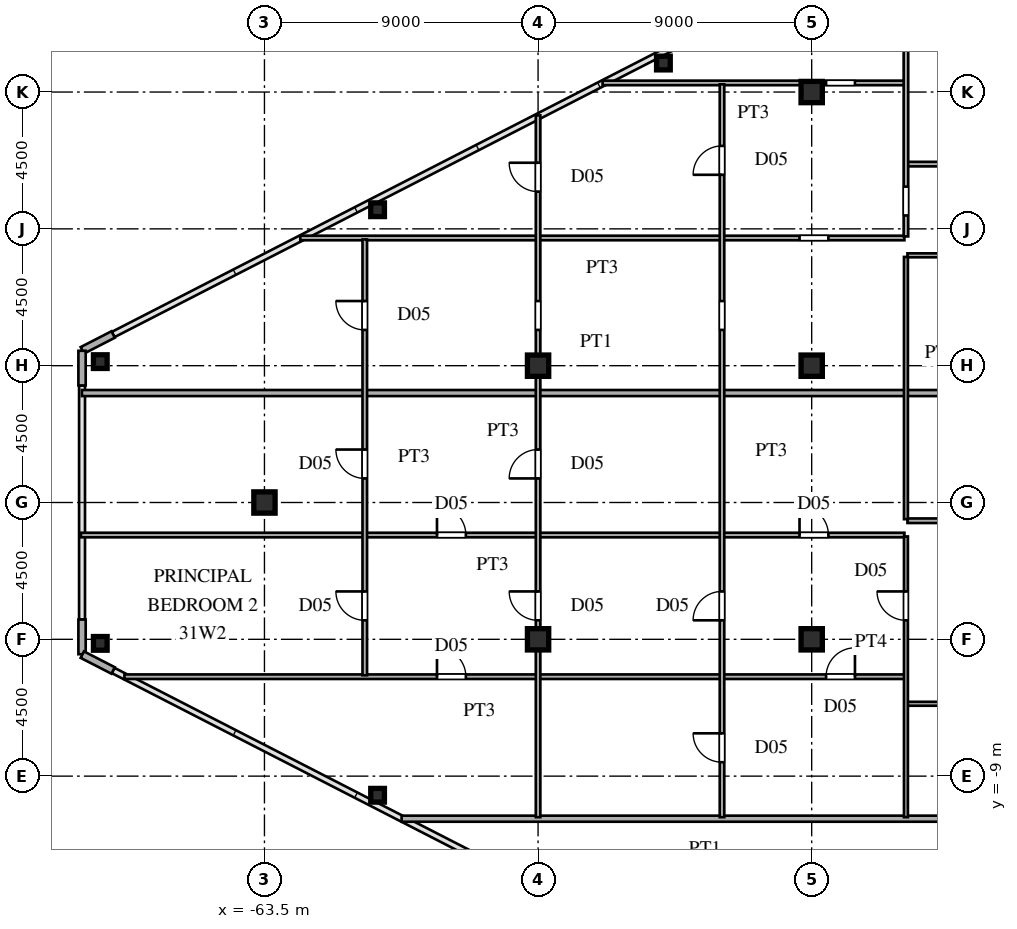
"""IFC4 building model, lengths in metres.
Left out: names, types, materials, properties, quantities, classifications, styles, units other than length and angle.
Written with IfcOpenShell. Run it as: python <this file> out.ifc"""

import sys

from ifc_helpers import new_model, si_unit, direction, frame, frame_2d, origin, origin_2d, place, context, subcontext, project, spatial, rectangle, hollow_rectangle, i_section, extrude, source, transform, mapped, element, fill, save


model = new_model("IFC4")
c1 = context("Model", 3, precision=1e-05, world=origin(), true_north=direction((0.0, 1.0)))
c2 = subcontext(c1, "Body", "Model", "MODEL_VIEW")
j1 = project(units=[si_unit("LENGTHUNIT", "METRE"), si_unit("PLANEANGLEUNIT", "RADIAN")], contexts=[c1])
p1 = place(None, origin())
s1 = spatial("IfcSite", under=j1, at=p1, CompositionType="ELEMENT")
p2 = place(p1, origin())
s2 = spatial("IfcBuilding", under=s1, at=p2, CompositionType="ELEMENT")
p3 = place(p2, frame((0.0, 0.0, 117.6)))
s3 = spatial("IfcBuildingStorey", under=s2, at=p3, CompositionType="ELEMENT", Elevation=117.6)
m1 = source(origin(), c2, "Body", "SweptSolid", [
    extrude(i_section(OverallWidth=0.7, OverallDepth=0.7, WebThickness=0.028, FlangeThickness=0.045, at=origin_2d()), origin(), (0.0, 0.0, 1.0), 3.6),
])
for number, where, z_axis, x_axis in (
    (1, (-45.5, -4.5, 0.0), (0.0, 0.0, 1.0), (1.0, 0.0, 0.0)),
    (2, (-45.5, 4.5, 0.0), (0.0, 0.0, 1.0), (1.0, 0.0, 0.0)),
    (3, (-45.5, 13.5, 0.0), (0.0, 0.0, 1.0), (1.0, 0.0, 0.0)),
    (4, (-54.5, -4.5, 0.0), (0.0, 0.0, 1.0), (1.0, 0.0, 0.0)),
    (5, (-54.5, 4.5, 0.0), (0.0, 0.0, 1.0), (1.0, 0.0, 0.0)),
    (6, (-63.5, 0.0, 0.0), (0.0, 0.0, 1.0), (1.0, 0.0, 0.0)),
):
    element("IfcColumn", number, at=place(p3, frame(where, z_axis=z_axis, x_axis=x_axis)), inside=s3, PredefinedType="COLUMN", context=c2, shape_type="MappedRepresentation", body=[
        mapped(m1, transform((0.0, 0.0, 0.0), scale=1.0)),
    ])
m2 = source(origin(), c2, "Body", "SweptSolid", [
    extrude(hollow_rectangle(XDim=0.45, YDim=0.45, WallThickness=0.018, at=origin_2d()), origin(), (0.0, 0.0, 1.0), 3.6),
])
for number, where, z_axis, x_axis in (
    (7, (-68.9, 4.634, 0.0), (0.0, 0.0, 1.0), (1.0, 0.0, 0.0)),
    (8, (-68.9, -4.634, 0.0), (0.0, 0.0, 1.0), (1.0, 0.0, 0.0)),
    (9, (-59.779, -9.629, 0.0), (0.0, 0.0, 1.0), (1.0, 0.0, 0.0)),
    (10, (-50.377, 14.453, 0.0), (0.0, 0.0, 1.0), (1.0, 0.0, 0.0)),
    (11, (-59.779, 9.629, 0.0), (0.0, 0.0, 1.0), (1.0, 0.0, 0.0)),
):
    element("IfcColumn", number, at=place(p3, frame(where, z_axis=z_axis, x_axis=x_axis)), inside=s3, PredefinedType="COLUMN", context=c2, shape_type="MappedRepresentation", body=[
        mapped(m2, transform((0.0, 0.0, 0.0), scale=1.0)),
    ])
p4 = place(p3, frame((-68.477, 5.525, 0.0), z_axis=(0.0, 0.0, 1.0), x_axis=(-0.889797395748, -0.456355776255, 0.0)))
e12 = element("IfcWall", 12, at=p4, inside=s3, PredefinedType="SOLIDWALL", context=c2, shape_type="SweptSolid", body=[
    extrude(rectangle(XDim=1.14, YDim=0.24, at=frame_2d((0.57, 0.0))), origin(), (0.0, 0.0, 1.0), 3.38),
])
for number, where, z_axis, x_axis in (
    (13, (-69.5, 4.99, 0.0), (0.0, 0.0, 1.0), (0.0, -1.0, 0.0)),
    (14, (-69.5, -3.85, 0.0), (0.0, 0.0, 1.0), (0.0, -1.0, 0.0)),
):
    element("IfcWall", number, at=place(p3, frame(where, z_axis=z_axis, x_axis=x_axis)), inside=s3, PredefinedType="SOLIDWALL", context=c2, shape_type="SweptSolid", body=[
        extrude(rectangle(XDim=1.14, YDim=0.24, at=frame_2d((0.57, 0.0))), origin(), (0.0, 0.0, 1.0), 3.38),
    ])
p5 = place(p3, frame((-69.491, -5.005, 0.0), z_axis=(0.0, 0.0, 1.0), x_axis=(0.889797395748, -0.456355776255, 0.0)))
e15 = element("IfcWall", 15, at=p5, inside=s3, PredefinedType="SOLIDWALL", context=c2, shape_type="SweptSolid", body=[
    extrude(rectangle(XDim=1.14, YDim=0.24, at=frame_2d((0.57, 0.0))), origin(), (0.0, 0.0, 1.0), 3.38),
])
p6 = place(p3, frame((-58.988, -10.4, 0.0), z_axis=(0.0, 0.0, 1.0), x_axis=(1.0, 0.0, 0.0)))
e16 = element("IfcWall", 16, at=p6, inside=s3, PredefinedType="PARTITIONING", context=c2, shape_type="SweptSolid", body=[
    extrude(rectangle(XDim=19.958, YDim=0.2, at=frame_2d((9.979, 0.0))), origin(), (0.0, 0.0, 1.0), 3.38),
])
p7 = place(p3, frame((-42.35, -6.62, 0.0), z_axis=(0.0, 0.0, 1.0), x_axis=(1.0, 0.0, 0.0)))
e17 = element("IfcWall", 17, at=p7, inside=s3, PredefinedType="PARTITIONING", context=c2, shape_type="SweptSolid", body=[
    extrude(rectangle(XDim=3.35, YDim=0.13, at=frame_2d((1.675, 0.0))), origin(), (0.0, 0.0, 1.0), 3.38),
])
p8 = place(p7, frame((1.235, 0.0, 0.0)))
e18 = element("IfcOpeningElement", 18, at=p8, cuts=e17, PredefinedType="OPENING", context=c2, shape_type="SweptSolid", body=[
    extrude(rectangle(XDim=0.88, YDim=2.1, at=frame_2d((0.44, 1.05))), frame((0.0, 0.075, 0.0), z_axis=(0.0, -1.0, 0.0), x_axis=(1.0, 0.0, 0.0)), (0.0, 0.0, 1.0), 0.15),
])
p9 = place(p3, frame((-68.106, -5.73, 0.0), z_axis=(0.0, 0.0, 1.0), x_axis=(1.0, 0.0, 0.0)))
e19 = element("IfcWall", 19, at=p9, inside=s3, PredefinedType="PARTITIONING", context=c2, shape_type="SweptSolid", body=[
    extrude(rectangle(XDim=25.656, YDim=0.15, at=frame_2d((12.828, 0.0))), origin(), (0.0, 0.0, 1.0), 3.38),
])
p10 = place(p9, frame((23.079, 0.0, 0.0)))
e20 = element("IfcOpeningElement", 20, at=p10, cuts=e19, PredefinedType="OPENING", context=c2, shape_type="SweptSolid", body=[
    extrude(rectangle(XDim=0.95, YDim=2.15, at=frame_2d((0.475, 1.075))), frame((0.0, 0.085, 0.0), z_axis=(0.0, -1.0, 0.0), x_axis=(1.0, 0.0, 0.0)), (0.0, 0.0, 1.0), 0.17),
])
p11 = place(p9, frame((10.281, 0.0, 0.0)))
e21 = element("IfcOpeningElement", 21, at=p11, cuts=e19, PredefinedType="OPENING", context=c2, shape_type="SweptSolid", body=[
    extrude(rectangle(XDim=0.95, YDim=2.15, at=frame_2d((0.475, 1.075))), frame((0.0, 0.085, 0.0), z_axis=(0.0, -1.0, 0.0), x_axis=(1.0, 0.0, 0.0)), (0.0, 0.0, 1.0), 0.17),
])
p12 = place(p3, frame((-69.535, -1.07, 0.0), z_axis=(0.0, 0.0, 1.0), x_axis=(1.0, 0.0, 0.0)))
e22 = element("IfcWall", 22, at=p12, inside=s3, PredefinedType="PARTITIONING", context=c2, shape_type="SweptSolid", body=[
    extrude(rectangle(XDim=27.085, YDim=0.15, at=frame_2d((13.542, 0.0))), origin(), (0.0, 0.0, 1.0), 3.38),
])
p13 = place(p12, frame((23.635, 0.0, 0.0)))
e23 = element("IfcOpeningElement", 23, at=p13, cuts=e22, PredefinedType="OPENING", context=c2, shape_type="SweptSolid", body=[
    extrude(rectangle(XDim=0.95, YDim=2.15, at=frame_2d((0.475, 1.075))), frame((0.0, 0.085, 0.0), z_axis=(0.0, -1.0, 0.0), x_axis=(1.0, 0.0, 0.0)), (0.0, 0.0, 1.0), 0.17),
])
p14 = place(p12, frame((11.71, 0.0, 0.0)))
e24 = element("IfcOpeningElement", 24, at=p14, cuts=e22, PredefinedType="OPENING", context=c2, shape_type="SweptSolid", body=[
    extrude(rectangle(XDim=0.95, YDim=2.15, at=frame_2d((0.475, 1.075))), frame((0.0, 0.085, 0.0), z_axis=(0.0, -1.0, 0.0), x_axis=(1.0, 0.0, 0.0)), (0.0, 0.0, 1.0), 0.17),
])
p15 = place(p3, frame((-42.35, -0.6, 0.0), z_axis=(0.0, 0.0, 1.0), x_axis=(1.0, 0.0, 0.0)))
e25 = element("IfcWall", 25, at=p15, inside=s3, PredefinedType="PARTITIONING", context=c2, shape_type="SweptSolid", body=[
    extrude(rectangle(XDim=3.35, YDim=0.15, at=frame_2d((1.675, 0.0))), origin(), (0.0, 0.0, 1.0), 3.38),
])
p16 = place(p15, frame((1.2, 0.0, 0.0)))
e26 = element("IfcOpeningElement", 26, at=p16, cuts=e25, PredefinedType="OPENING", context=c2, shape_type="SweptSolid", body=[
    extrude(rectangle(XDim=0.95, YDim=2.15, at=frame_2d((0.475, 1.075))), frame((0.0, 0.085, 0.0), z_axis=(0.0, -1.0, 0.0), x_axis=(1.0, 0.0, 0.0)), (0.0, 0.0, 1.0), 0.17),
])
p17 = place(p3, frame((-69.505, 3.6, 0.0), z_axis=(0.0, 0.0, 1.0), x_axis=(1.0, 0.0, 0.0)))
e27 = element("IfcWall", 27, at=p17, inside=s3, PredefinedType="PARTITIONING", context=c2, shape_type="SweptSolid", body=[
    extrude(rectangle(XDim=30.475, YDim=0.2, at=frame_2d((15.237, 0.0))), origin(), (0.0, 0.0, 1.0), 3.38),
])
p18 = place(p3, frame((-42.35, 8.13, 0.0), z_axis=(0.0, 0.0, 1.0), x_axis=(1.0, 0.0, 0.0)))
e28 = element("IfcWall", 28, at=p18, inside=s3, PredefinedType="PARTITIONING", context=c2, shape_type="SweptSolid", body=[
    extrude(rectangle(XDim=3.35, YDim=0.13, at=frame_2d((1.675, 0.0))), origin(), (0.0, 0.0, 1.0), 3.38),
])
p19 = place(p18, frame((1.235, 0.0, 0.0)))
e29 = element("IfcOpeningElement", 29, at=p19, cuts=e28, PredefinedType="OPENING", context=c2, shape_type="SweptSolid", body=[
    extrude(rectangle(XDim=0.88, YDim=2.1, at=frame_2d((0.44, 1.05))), frame((0.0, 0.075, 0.0), z_axis=(0.0, -1.0, 0.0), x_axis=(1.0, 0.0, 0.0)), (0.0, 0.0, 1.0), 0.15),
])
p20 = place(p3, frame((-62.321, 8.7, 0.0), z_axis=(0.0, 0.0, 1.0), x_axis=(1.0, 0.0, 0.0)))
e30 = element("IfcWall", 30, at=p20, inside=s3, PredefinedType="PARTITIONING", context=c2, shape_type="SweptSolid", body=[
    extrude(rectangle(XDim=19.871, YDim=0.15, at=frame_2d((9.936, 0.0))), origin(), (0.0, 0.0, 1.0), 3.38),
])
p21 = place(p20, frame((16.421, 0.0, 0.0)))
e31 = element("IfcOpeningElement", 31, at=p21, cuts=e30, PredefinedType="OPENING", context=c2, shape_type="SweptSolid", body=[
    extrude(rectangle(XDim=0.95, YDim=2.15, at=frame_2d((0.475, 1.075))), frame((0.0, 0.085, 0.0), z_axis=(0.0, -1.0, 0.0), x_axis=(1.0, 0.0, 0.0)), (0.0, 0.0, 1.0), 0.17),
])
p22 = place(p3, frame((-42.35, 11.13, 0.0), z_axis=(0.0, 0.0, 1.0), x_axis=(1.0, 0.0, 0.0)))
e32 = element("IfcWall", 32, at=p22, inside=s3, PredefinedType="PARTITIONING", context=c2, shape_type="SweptSolid", body=[
    extrude(rectangle(XDim=3.35, YDim=0.15, at=frame_2d((1.675, 0.0))), origin(), (0.0, 0.0, 1.0), 3.38),
])
p23 = place(p22, frame((1.2, 0.0, 0.0)))
e33 = element("IfcOpeningElement", 33, at=p23, cuts=e32, PredefinedType="OPENING", context=c2, shape_type="SweptSolid", body=[
    extrude(rectangle(XDim=0.95, YDim=2.15, at=frame_2d((0.475, 1.075))), frame((0.0, 0.085, 0.0), z_axis=(0.0, -1.0, 0.0), x_axis=(1.0, 0.0, 0.0)), (0.0, 0.0, 1.0), 0.17),
])
p24 = place(p3, frame((-52.378, 13.8, 0.0), z_axis=(0.0, 0.0, 1.0), x_axis=(1.0, 0.0, 0.0)))
e34 = element("IfcWall", 34, at=p24, inside=s3, PredefinedType="PARTITIONING", context=c2, shape_type="SweptSolid", body=[
    extrude(rectangle(XDim=9.928, YDim=0.15, at=frame_2d((4.964, 0.0))), origin(), (0.0, 0.0, 1.0), 2.78),
])
p25 = place(p24, frame((7.351, 0.0, 0.0)))
e35 = element("IfcOpeningElement", 35, at=p25, cuts=e34, PredefinedType="OPENING", context=c2, shape_type="SweptSolid", body=[
    extrude(rectangle(XDim=0.95, YDim=2.15, at=frame_2d((0.475, 1.075))), frame((0.0, 0.085, 0.0), z_axis=(0.0, -1.0, 0.0), x_axis=(1.0, 0.0, 0.0)), (0.0, 0.0, 1.0), 0.17),
])
p26 = place(p3, frame((-60.2, -5.683, 0.0), z_axis=(0.0, 0.0, 1.0), x_axis=(0.0, 1.0, 0.0)))
e36 = element("IfcWall", 36, at=p26, inside=s3, PredefinedType="PARTITIONING", context=c2, shape_type="SweptSolid", body=[
    extrude(rectangle(XDim=14.335, YDim=0.15, at=frame_2d((7.167, 0.0))), origin(), (0.0, 0.0, 1.0), 3.38),
])
p27 = place(p26, frame((1.808, 0.0, 0.0)))
e37 = element("IfcOpeningElement", 37, at=p27, cuts=e36, PredefinedType="OPENING", context=c2, shape_type="SweptSolid", body=[
    extrude(rectangle(XDim=0.95, YDim=2.15, at=frame_2d((0.475, 1.075))), frame((0.0, 0.085, 0.0), z_axis=(0.0, -1.0, 0.0), x_axis=(1.0, 0.0, 0.0)), (0.0, 0.0, 1.0), 0.17),
])
p28 = place(p26, frame((6.475, 0.0, 0.0)))
e38 = element("IfcOpeningElement", 38, at=p28, cuts=e36, PredefinedType="OPENING", context=c2, shape_type="SweptSolid", body=[
    extrude(rectangle(XDim=0.95, YDim=2.15, at=frame_2d((0.475, 1.075))), frame((0.0, 0.085, 0.0), z_axis=(0.0, -1.0, 0.0), x_axis=(1.0, 0.0, 0.0)), (0.0, 0.0, 1.0), 0.17),
])
p29 = place(p26, frame((11.359, 0.0, 0.0)))
e39 = element("IfcOpeningElement", 39, at=p29, cuts=e36, PredefinedType="OPENING", context=c2, shape_type="SweptSolid", body=[
    extrude(rectangle(XDim=0.95, YDim=2.15, at=frame_2d((0.475, 1.075))), frame((0.0, 0.085, 0.0), z_axis=(0.0, -1.0, 0.0), x_axis=(1.0, 0.0, 0.0)), (0.0, 0.0, 1.0), 0.17),
])
p30 = place(p3, frame((-54.5, -10.35, 0.0), z_axis=(0.0, 0.0, 1.0), x_axis=(0.0, 1.0, 0.0)))
e40 = element("IfcWall", 40, at=p30, inside=s3, PredefinedType="PARTITIONING", context=c2, shape_type="SweptSolid", body=[
    extrude(rectangle(XDim=23.082, YDim=0.15, at=frame_2d((11.541, 0.0))), origin(), (0.0, 0.0, 1.0), 2.78),
])
p31 = place(p30, frame((6.475, 0.0, 0.0)))
e41 = element("IfcOpeningElement", 41, at=p31, cuts=e40, PredefinedType="OPENING", context=c2, shape_type="SweptSolid", body=[
    extrude(rectangle(XDim=0.95, YDim=2.15, at=frame_2d((0.475, 1.075))), frame((0.0, 0.085, 0.0), z_axis=(0.0, -1.0, 0.0), x_axis=(1.0, 0.0, 0.0)), (0.0, 0.0, 1.0), 0.17),
])
p32 = place(p30, frame((11.142, 0.0, 0.0)))
e42 = element("IfcOpeningElement", 42, at=p32, cuts=e40, PredefinedType="OPENING", context=c2, shape_type="SweptSolid", body=[
    extrude(rectangle(XDim=0.95, YDim=2.15, at=frame_2d((0.475, 1.075))), frame((0.0, 0.085, 0.0), z_axis=(0.0, -1.0, 0.0), x_axis=(1.0, 0.0, 0.0)), (0.0, 0.0, 1.0), 0.17),
])
p33 = place(p30, frame((20.575, 0.0, 0.0)))
e43 = element("IfcOpeningElement", 43, at=p33, cuts=e40, PredefinedType="OPENING", context=c2, shape_type="SweptSolid", body=[
    extrude(rectangle(XDim=0.95, YDim=2.15, at=frame_2d((0.475, 1.075))), frame((0.0, 0.085, 0.0), z_axis=(0.0, -1.0, 0.0), x_axis=(1.0, 0.0, 0.0)), (0.0, 0.0, 1.0), 0.17),
])
p34 = place(p30, frame((16.026, 0.0, 0.0)))
e44 = element("IfcOpeningElement", 44, at=p34, cuts=e40, PredefinedType="OPENING", context=c2, shape_type="SweptSolid", body=[
    extrude(rectangle(XDim=0.95, YDim=2.15, at=frame_2d((0.475, 1.075))), frame((0.0, 0.085, 0.0), z_axis=(0.0, -1.0, 0.0), x_axis=(1.0, 0.0, 0.0)), (0.0, 0.0, 1.0), 0.17),
])
p35 = place(p3, frame((-48.45, -10.35, 0.0), z_axis=(0.0, 0.0, 1.0), x_axis=(0.0, 1.0, 0.0)))
e45 = element("IfcWall", 45, at=p35, inside=s3, PredefinedType="PARTITIONING", context=c2, shape_type="SweptSolid", body=[
    extrude(rectangle(XDim=24.104, YDim=0.15, at=frame_2d((12.052, 0.0))), origin(), (0.0, 0.0, 1.0), 3.38),
])
p36 = place(p35, frame((6.475, 0.0, 0.0)))
e46 = element("IfcOpeningElement", 46, at=p36, cuts=e45, PredefinedType="OPENING", context=c2, shape_type="SweptSolid", body=[
    extrude(rectangle(XDim=0.95, YDim=2.15, at=frame_2d((0.475, 1.075))), frame((0.0, 0.085, 0.0), z_axis=(0.0, -1.0, 0.0), x_axis=(1.0, 0.0, 0.0)), (0.0, 0.0, 1.0), 0.17),
])
p37 = place(p35, frame((1.808, 0.0, 0.0)))
e47 = element("IfcOpeningElement", 47, at=p37, cuts=e45, PredefinedType="OPENING", context=c2, shape_type="SweptSolid", body=[
    extrude(rectangle(XDim=0.95, YDim=2.15, at=frame_2d((0.475, 1.075))), frame((0.0, 0.085, 0.0), z_axis=(0.0, -1.0, 0.0), x_axis=(1.0, 0.0, 0.0)), (0.0, 0.0, 1.0), 0.17),
])
p38 = place(p35, frame((21.128, 0.0, 0.0)))
e48 = element("IfcOpeningElement", 48, at=p38, cuts=e45, PredefinedType="OPENING", context=c2, shape_type="SweptSolid", body=[
    extrude(rectangle(XDim=0.95, YDim=2.15, at=frame_2d((0.475, 1.075))), frame((0.0, 0.085, 0.0), z_axis=(0.0, -1.0, 0.0), x_axis=(1.0, 0.0, 0.0)), (0.0, 0.0, 1.0), 0.17),
])
p39 = place(p35, frame((16.026, 0.0, 0.0)))
e49 = element("IfcOpeningElement", 49, at=p39, cuts=e45, PredefinedType="OPENING", context=c2, shape_type="SweptSolid", body=[
    extrude(rectangle(XDim=0.95, YDim=2.15, at=frame_2d((0.475, 1.075))), frame((0.0, 0.085, 0.0), z_axis=(0.0, -1.0, 0.0), x_axis=(1.0, 0.0, 0.0)), (0.0, 0.0, 1.0), 0.17),
])
p40 = place(p3, frame((-42.4, -10.35, 0.0), z_axis=(0.0, 0.0, 1.0), x_axis=(0.0, 1.0, 0.0)))
e50 = element("IfcWall", 50, at=p40, inside=s3, PredefinedType="PARTITIONING", context=c2, shape_type="SweptSolid", body=[
    extrude(rectangle(XDim=9.233, YDim=0.13, at=frame_2d((4.617, 0.0))), origin(), (0.0, 0.0, 1.0), 3.38),
])
p41 = place(p40, frame((6.475, 0.0, 0.0)))
e51 = element("IfcOpeningElement", 51, at=p41, cuts=e50, PredefinedType="OPENING", context=c2, shape_type="SweptSolid", body=[
    extrude(rectangle(XDim=0.95, YDim=2.15, at=frame_2d((0.475, 1.075))), frame((0.0, 0.075, 0.0), z_axis=(0.0, -1.0, 0.0), x_axis=(1.0, 0.0, 0.0)), (0.0, 0.0, 1.0), 0.15),
])
p42 = place(p3, frame((-42.4, -0.548, 0.0), z_axis=(0.0, 0.0, 1.0), x_axis=(0.0, 1.0, 0.0)))
e52 = element("IfcWall", 52, at=p42, inside=s3, PredefinedType="PARTITIONING", context=c2, shape_type="SweptSolid", body=[
    extrude(rectangle(XDim=8.625, YDim=0.13, at=frame_2d((4.312, 0.0))), origin(), (0.0, 0.0, 1.0), 3.38),
])
p43 = place(p3, frame((-42.4, 8.752, 0.0), z_axis=(0.0, 0.0, 1.0), x_axis=(0.0, 1.0, 0.0)))
e53 = element("IfcWall", 53, at=p43, inside=s3, PredefinedType="PARTITIONING", context=c2, shape_type="SweptSolid", body=[
    extrude(rectangle(XDim=10.19, YDim=0.15, at=frame_2d((5.095, 0.0))), origin(), (0.0, 0.0, 1.0), 3.38),
])
p44 = place(p43, frame((0.688, 0.0, 0.0)))
e54 = element("IfcOpeningElement", 54, at=p44, cuts=e53, PredefinedType="OPENING", context=c2, shape_type="SweptSolid", body=[
    extrude(rectangle(XDim=0.95, YDim=2.15, at=frame_2d((0.475, 1.075))), frame((0.0, 0.085, 0.0), z_axis=(0.0, -1.0, 0.0), x_axis=(1.0, 0.0, 0.0)), (0.0, 0.0, 1.0), 0.17),
])
m3 = source(origin(), c2, "Body", "SweptSolid", [
    extrude(rectangle(XDim=0.95, YDim=2.15, at=frame_2d((0.475, 1.075))), frame((0.0, 0.025, 0.0), z_axis=(0.0, -1.0, 0.0), x_axis=(1.0, 0.0, 0.0)), (0.0, 0.0, 1.0), 0.05),
])
p45 = place(p10, origin())
e55 = element("IfcDoor", 55, at=p45, inside=s3, OperationType="SINGLE_SWING_RIGHT", PredefinedType="DOOR", context=c2, shape_type="MappedRepresentation", body=[
    mapped(m3, transform((0.0, 0.0, 0.0), scale=1.0)),
])
fill(e20, e55)
p46 = place(p11, origin())
e56 = element("IfcDoor", 56, at=p46, inside=s3, OperationType="SINGLE_SWING_LEFT", PredefinedType="DOOR", context=c2, shape_type="MappedRepresentation", body=[
    mapped(m3, transform((0.0, 0.0, 0.0), scale=1.0)),
])
fill(e21, e56)
p47 = place(p13, origin())
e57 = element("IfcDoor", 57, at=p47, inside=s3, OperationType="SINGLE_SWING_LEFT", PredefinedType="DOOR", context=c2, shape_type="MappedRepresentation", body=[
    mapped(m3, transform((0.0, 0.0, 0.0), scale=1.0)),
])
fill(e23, e57)
p48 = place(p14, origin())
e58 = element("IfcDoor", 58, at=p48, inside=s3, OperationType="SINGLE_SWING_LEFT", PredefinedType="DOOR", context=c2, shape_type="MappedRepresentation", body=[
    mapped(m3, transform((0.0, 0.0, 0.0), scale=1.0)),
])
fill(e24, e58)
p49 = place(p27, origin())
e59 = element("IfcDoor", 59, at=p49, inside=s3, OperationType="SINGLE_SWING_RIGHT", PredefinedType="DOOR", context=c2, shape_type="MappedRepresentation", body=[
    mapped(m3, transform((0.0, 0.0, 0.0), scale=1.0)),
])
fill(e37, e59)
p50 = place(p28, origin())
e60 = element("IfcDoor", 60, at=p50, inside=s3, OperationType="SINGLE_SWING_RIGHT", PredefinedType="DOOR", context=c2, shape_type="MappedRepresentation", body=[
    mapped(m3, transform((0.0, 0.0, 0.0), scale=1.0)),
])
fill(e38, e60)
p51 = place(p29, origin())
e61 = element("IfcDoor", 61, at=p51, inside=s3, OperationType="SINGLE_SWING_RIGHT", PredefinedType="DOOR", context=c2, shape_type="MappedRepresentation", body=[
    mapped(m3, transform((0.0, 0.0, 0.0), scale=1.0)),
])
fill(e39, e61)
p52 = place(p31, origin())
e62 = element("IfcDoor", 62, at=p52, inside=s3, OperationType="SINGLE_SWING_RIGHT", PredefinedType="DOOR", context=c2, shape_type="MappedRepresentation", body=[
    mapped(m3, transform((0.0, 0.0, 0.0), scale=1.0)),
])
fill(e41, e62)
p53 = place(p32, origin())
e63 = element("IfcDoor", 63, at=p53, inside=s3, OperationType="SINGLE_SWING_LEFT", PredefinedType="DOOR", context=c2, shape_type="MappedRepresentation", body=[
    mapped(m3, transform((0.0, 0.0, 0.0), scale=1.0)),
])
fill(e42, e63)
p54 = place(p33, origin())
e64 = element("IfcDoor", 64, at=p54, inside=s3, OperationType="SINGLE_SWING_RIGHT", PredefinedType="DOOR", context=c2, shape_type="MappedRepresentation", body=[
    mapped(m3, transform((0.0, 0.0, 0.0), scale=1.0)),
])
fill(e43, e64)
p55 = place(p36, origin())
e65 = element("IfcDoor", 65, at=p55, inside=s3, OperationType="SINGLE_SWING_LEFT", PredefinedType="DOOR", context=c2, shape_type="MappedRepresentation", body=[
    mapped(m3, transform((0.0, 0.0, 0.0), scale=1.0)),
])
fill(e46, e65)
p56 = place(p37, origin())
e66 = element("IfcDoor", 66, at=p56, inside=s3, OperationType="SINGLE_SWING_RIGHT", PredefinedType="DOOR", context=c2, shape_type="MappedRepresentation", body=[
    mapped(m3, transform((0.0, 0.0, 0.0), scale=1.0)),
])
fill(e47, e66)
p57 = place(p38, origin())
e67 = element("IfcDoor", 67, at=p57, inside=s3, OperationType="SINGLE_SWING_LEFT", PredefinedType="DOOR", context=c2, shape_type="MappedRepresentation", body=[
    mapped(m3, transform((0.0, 0.0, 0.0), scale=1.0)),
])
fill(e48, e67)
p58 = place(p41, origin())
e68 = element("IfcDoor", 68, at=p58, inside=s3, OperationType="SINGLE_SWING_RIGHT", PredefinedType="DOOR", context=c2, shape_type="MappedRepresentation", body=[
    mapped(m3, transform((0.0, 0.0, 0.0), scale=1.0)),
])
fill(e51, e68)
save(model, sys.argv[1])
